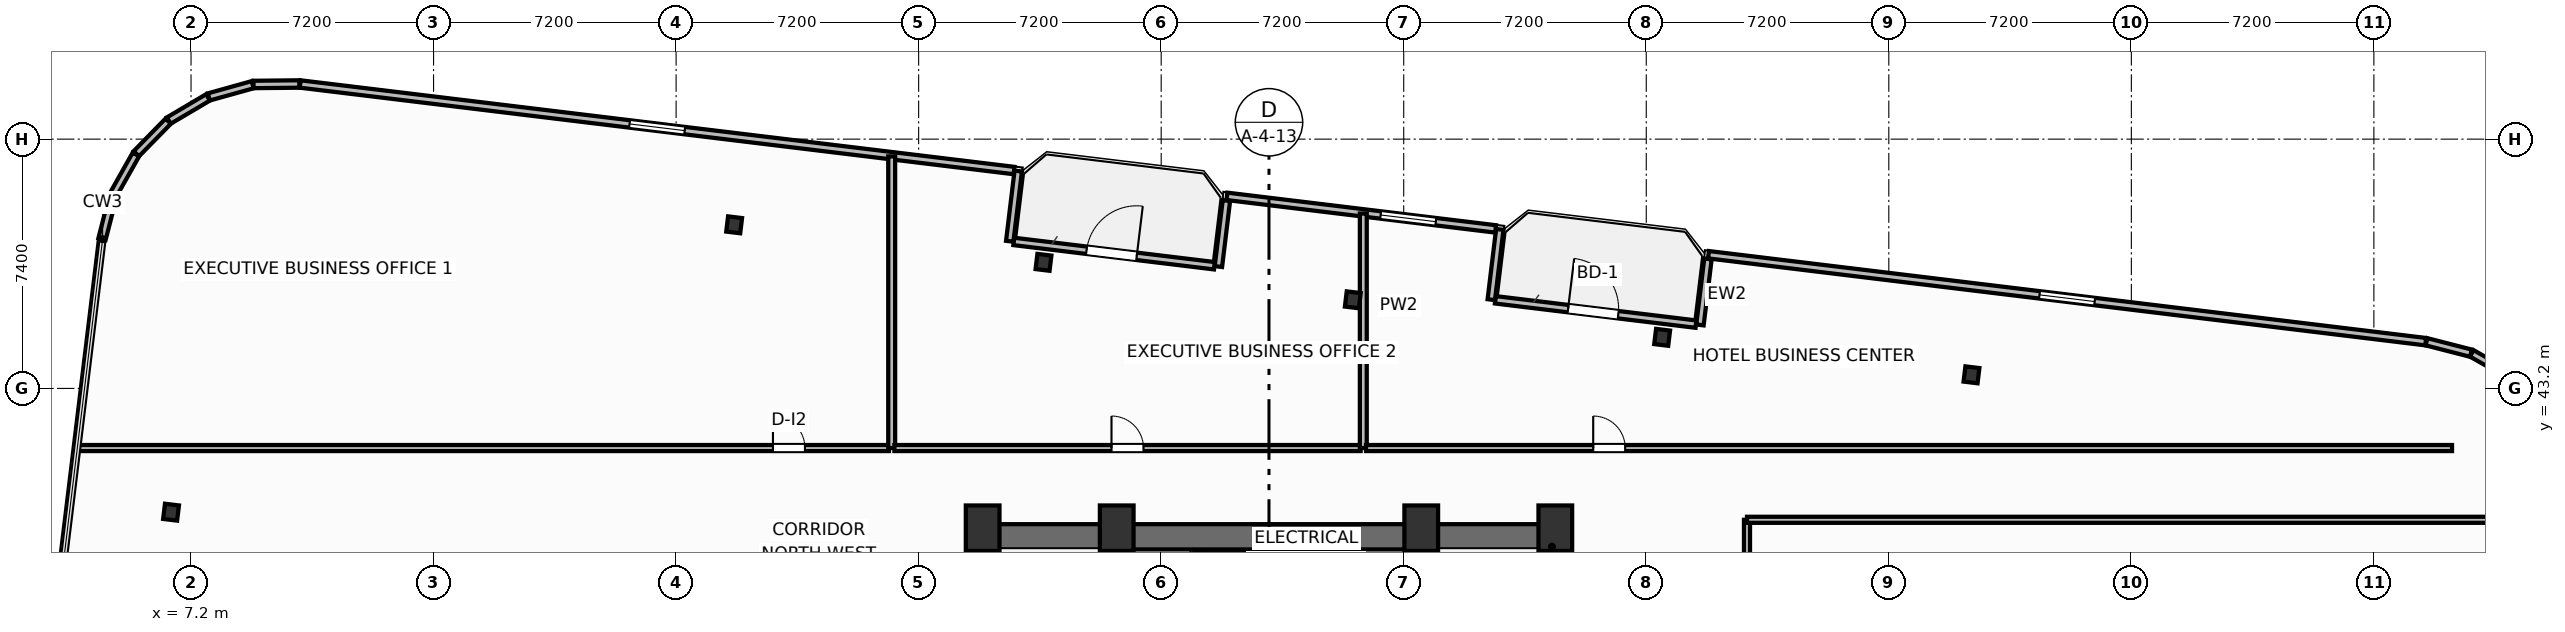
"""IFC4 building model, lengths in metres.
Left out: names, types, materials, properties, quantities, classifications, styles, units other than length and angle.
Written with IfcOpenShell. Run it as: python <this file> out.ifc"""

import sys

from ifc_helpers import new_model, si_unit, direction, frame, frame_2d, origin, origin_2d, place, context, subcontext, project, spatial, rectangle, i_section, extrude, element, fill, save


model = new_model("IFC4")
c1 = context("Model", 3, precision=1e-05, world=origin(), true_north=direction((0.0, 1.0)))
c2 = subcontext(c1, "Body", "Model", "MODEL_VIEW")
j1 = project(units=[si_unit("LENGTHUNIT", "METRE"), si_unit("PLANEANGLEUNIT", "RADIAN")], contexts=[c1])
p1 = place(None, origin())
s1 = spatial("IfcSite", under=j1, at=p1, CompositionType="ELEMENT")
p2 = place(p1, origin())
s2 = spatial("IfcBuilding", under=s1, at=p2, CompositionType="ELEMENT")
p3 = place(p2, frame((0.0, 0.0, 140.2)))
s3 = spatial("IfcBuildingStorey", under=s2, at=p3, CompositionType="ELEMENT", Elevation=140.2)
for number, where, z_axis, x_axis in (
    (1, (30.7, 39.05, 0.0), (0.0, 0.0, 1.0), (1.0, 0.0, 0.0)),
    (2, (34.68, 39.05, 0.0), (0.0, 0.0, 1.0), (1.0, 0.0, 0.0)),
    (3, (43.72, 39.05, 0.0), (0.0, 0.0, 1.0), (1.0, 0.0, 0.0)),
    (4, (47.7, 39.05, 0.0), (0.0, 0.0, 1.0), (1.0, 0.0, 0.0)),
):
    element("IfcColumn", number, at=place(p3, frame(where, z_axis=z_axis, x_axis=x_axis)), inside=s3, PredefinedType="COLUMN", context=c2, shape_type="SweptSolid", body=[
        extrude(rectangle(XDim=1.0, YDim=1.35, at=origin_2d()), origin(), (0.0, 0.0, 1.0), 3.7),
    ])
p4 = place(p3, frame((30.38, 38.795, 0.0), z_axis=(0.0, 0.0, 1.0), x_axis=(1.0, 0.0, 0.0)))
e5 = element("IfcWall", 5, at=p4, inside=s3, PredefinedType="SHEAR", context=c2, shape_type="SweptSolid", body=[
    extrude(rectangle(XDim=17.64, YDim=0.75, at=frame_2d((8.82, 0.0))), origin(), (0.0, 0.0, 1.0), 3.45),
])
for number, where, z_axis, x_axis in (
    (6, (30.755, 29.2, 0.0), (0.0, 0.0, 1.0), (0.0, 1.0, 0.0)),
    (7, (47.645, 29.2, 0.0), (0.0, 0.0, 1.0), (0.0, 1.0, 0.0)),
):
    element("IfcWall", number, at=place(p3, frame(where, z_axis=z_axis, x_axis=x_axis)), inside=s3, PredefinedType="SHEAR", context=c2, shape_type="SweptSolid", body=[
        extrude(rectangle(XDim=9.22, YDim=0.75, at=frame_2d((4.61, 0.0))), origin(), (0.0, 0.0, 1.0), 3.45),
    ])
p5 = place(p3, frame((34.64, 29.2, 0.0), z_axis=(0.0, 0.0, 1.0), x_axis=(0.0, 1.0, 0.0)))
e8 = element("IfcWall", 8, at=p5, inside=s3, PredefinedType="SHEAR", context=c2, shape_type="SweptSolid", body=[
    extrude(rectangle(XDim=9.22, YDim=0.25, at=frame_2d((4.61, 0.0))), origin(), (0.0, 0.0, 1.0), 3.45),
])
p6 = place(p5, frame((0.65, 0.0, 0.0)))
e9 = element("IfcOpeningElement", 9, at=p6, cuts=e8, PredefinedType="OPENING", context=c2, shape_type="SweptSolid", body=[
    extrude(rectangle(XDim=1.05, YDim=2.15, at=frame_2d((0.525, 1.075))), frame((0.0, 0.135, 0.0), z_axis=(0.0, -1.0, 0.0), x_axis=(1.0, 0.0, 0.0)), (0.0, 0.0, 1.0), 0.27),
])
p7 = place(p3, frame((43.76, 29.2, 0.0), z_axis=(0.0, 0.0, 1.0), x_axis=(0.0, 1.0, 0.0)))
e10 = element("IfcWall", 10, at=p7, inside=s3, PredefinedType="SHEAR", context=c2, shape_type="SweptSolid", body=[
    extrude(rectangle(XDim=9.22, YDim=0.25, at=frame_2d((4.61, 0.0))), origin(), (0.0, 0.0, 1.0), 3.45),
])
p8 = place(p7, frame((0.65, 0.0, 0.0)))
e11 = element("IfcOpeningElement", 11, at=p8, cuts=e10, PredefinedType="OPENING", context=c2, shape_type="SweptSolid", body=[
    extrude(rectangle(XDim=1.05, YDim=2.15, at=frame_2d((0.525, 1.075))), frame((0.0, 0.135, 0.0), z_axis=(0.0, -1.0, 0.0), x_axis=(1.0, 0.0, 0.0)), (0.0, 0.0, 1.0), 0.27),
])
for number, where, z_axis, x_axis in (
    (12, (60.054, 43.603, 0.0), (0.0, 0.0, 1.0), (0.993, -0.12, 0.0)),
    (13, (50.872, 44.717, 0.0), (0.0, 0.0, 1.0), (0.993, -0.12, 0.0)),
    (14, (41.689, 45.83, 0.0), (0.0, 0.0, 1.0), (0.993, -0.12, 0.0)),
    (15, (32.506, 46.943, 0.0), (0.0, 0.0, 1.0), (0.993, -0.12, 0.0)),
    (16, (23.323, 48.056, 0.0), (0.0, 0.0, 1.0), (0.993, -0.12, 0.0)),
    (17, (6.607, 39.526, 0.0), (0.0, 0.0, 1.0), (0.993, -0.12, 0.0)),
):
    element("IfcColumn", number, at=place(p3, frame(where, z_axis=z_axis, x_axis=x_axis)), inside=s3, PredefinedType="COLUMN", context=c2, shape_type="SweptSolid", body=[
        extrude(i_section(OverallWidth=0.418, OverallDepth=0.455, WebThickness=0.042, FlangeThickness=0.068, FilletRadius=0.025, at=origin_2d()), origin(), (0.0, 0.0, 1.0), 3.7),
    ])
p9 = place(p3, frame((31.624, 47.563, 0.0), z_axis=(0.0, 0.0, 1.0), x_axis=(0.992729951822, -0.120362962556, 0.0)))
e18 = element("IfcWall", 18, at=p9, inside=s3, PredefinedType="SOLIDWALL", context=c2, shape_type="SweptSolid", body=[
    extrude(rectangle(XDim=6.0, YDim=0.22, at=frame_2d((3.0, 0.0))), origin(), (0.0, 0.0, 1.0), 2.73),
])
p10 = place(p9, frame((2.176, 0.0, 0.0)))
e19 = element("IfcOpeningElement", 19, at=p10, cuts=e18, PredefinedType="OPENING", context=c2, shape_type="SweptSolid", body=[
    extrude(rectangle(XDim=1.5, YDim=2.25, at=frame_2d((0.75, 1.125))), frame((0.0, 0.12, 0.0), z_axis=(0.0, -1.0, 0.0), x_axis=(1.0, 0.0, 0.0)), (0.0, 0.0, 1.0), 0.24),
])
p11 = place(p3, frame((45.92, 45.831, 0.0), z_axis=(0.0, 0.0, 1.0), x_axis=(0.992729951822, -0.120362962556, 0.0)))
e20 = element("IfcWall", 20, at=p11, inside=s3, PredefinedType="SOLIDWALL", context=c2, shape_type="SweptSolid", body=[
    extrude(rectangle(XDim=6.0, YDim=0.22, at=frame_2d((3.0, 0.0))), origin(), (0.0, 0.0, 1.0), 2.73),
])
p12 = place(p11, frame((2.176, 0.0, 0.0)))
e21 = element("IfcOpeningElement", 21, at=p12, cuts=e20, PredefinedType="OPENING", context=c2, shape_type="SweptSolid", body=[
    extrude(rectangle(XDim=1.5, YDim=2.25, at=frame_2d((0.75, 1.125))), frame((0.0, 0.12, 0.0), z_axis=(0.0, -1.0, 0.0), x_axis=(1.0, 0.0, 0.0)), (0.0, 0.0, 1.0), 0.24),
])
p13 = place(p3, frame((76.084, 43.575, 0.0), z_axis=(0.0, 0.0, 1.0), x_axis=(-0.871093268227, 0.491117621399, 0.0)))
e22 = element("IfcWall", 22, at=p13, inside=s3, PredefinedType="SOLIDWALL", context=c2, shape_type="SweptSolid", body=[
    extrude(rectangle(XDim=1.353, YDim=0.22, at=frame_2d((0.677, 0.0))), origin(), (0.0, 0.0, 1.0), 2.73),
])
p14 = place(p3, frame((74.881, 44.246, 0.0), z_axis=(0.0, 0.0, 1.0), x_axis=(-0.968549775063, 0.248819881091, 0.0)))
e23 = element("IfcWall", 23, at=p14, inside=s3, PredefinedType="SOLIDWALL", context=c2, shape_type="SweptSolid", body=[
    extrude(rectangle(XDim=1.361, YDim=0.22, at=frame_2d((0.68, 0.0))), origin(), (0.0, 0.0, 1.0), 2.73),
])
p15 = place(p3, frame((73.538, 44.588, 0.0), z_axis=(0.0, 0.0, 1.0), x_axis=(-0.992733493583, 0.120333747213, 0.0)))
e24 = element("IfcWall", 24, at=p15, inside=s3, PredefinedType="SOLIDWALL", context=c2, shape_type="SweptSolid", body=[
    extrude(rectangle(XDim=21.447, YDim=0.22, at=frame_2d((10.724, 0.0))), origin(), (0.0, 0.0, 1.0), 2.73),
])
p16 = place(p15, frame((9.899, 0.0, 0.8)))
e25 = element("IfcOpeningElement", 25, at=p16, cuts=e24, PredefinedType="OPENING", context=c2, shape_type="SweptSolid", body=[
    extrude(rectangle(XDim=1.65, YDim=1.65, at=frame_2d((0.825, 0.825))), frame((0.0, 0.12, 0.0), z_axis=(0.0, -1.0, 0.0), x_axis=(1.0, 0.0, 0.0)), (0.0, 0.0, 1.0), 0.24),
])
p17 = place(p3, frame((52.231, 47.045, 0.0), z_axis=(0.0, 0.0, 1.0), x_axis=(-0.120275992932, -0.992740492538, 0.0)))
e26 = element("IfcWall", 26, at=p17, inside=s3, PredefinedType="SOLIDWALL", context=c2, shape_type="SweptSolid", body=[
    extrude(rectangle(XDim=1.975, YDim=0.22, at=frame_2d((0.988, 0.0))), origin(), (0.0, 0.0, 1.0), 2.73),
])
p18 = place(p3, frame((45.799, 45.835, 0.0), z_axis=(0.0, 0.0, 1.0), x_axis=(0.120314009587, 0.992735885871, 0.0)))
e27 = element("IfcWall", 27, at=p18, inside=s3, PredefinedType="SOLIDWALL", context=c2, shape_type="SweptSolid", body=[
    extrude(rectangle(XDim=2.1, YDim=0.22, at=frame_2d((1.05, 0.0))), origin(), (0.0, 0.0, 1.0), 2.73),
])
p19 = place(p3, frame((45.928, 47.935, 0.0), z_axis=(0.0, 0.0, 1.0), x_axis=(-0.992730591876, 0.120357683402, 0.0)))
e28 = element("IfcWall", 28, at=p19, inside=s3, PredefinedType="SOLIDWALL", context=c2, shape_type="SweptSolid", body=[
    extrude(rectangle(XDim=8.035, YDim=0.22, at=frame_2d((4.017, 0.0))), origin(), (0.0, 0.0, 1.0), 2.73),
])
p20 = place(p19, frame((1.788, 0.0, 0.8)))
e29 = element("IfcOpeningElement", 29, at=p20, cuts=e28, PredefinedType="OPENING", context=c2, shape_type="SweptSolid", body=[
    extrude(rectangle(XDim=1.65, YDim=1.65, at=frame_2d((0.825, 0.825))), frame((0.0, 0.12, 0.0), z_axis=(0.0, -1.0, 0.0), x_axis=(1.0, 0.0, 0.0)), (0.0, 0.0, 1.0), 0.24),
])
p21 = place(p3, frame((37.936, 48.778, 0.0), z_axis=(0.0, 0.0, 1.0), x_axis=(-0.120397815541, -0.992725725472, 0.0)))
e30 = element("IfcWall", 30, at=p21, inside=s3, PredefinedType="SOLIDWALL", context=c2, shape_type="SweptSolid", body=[
    extrude(rectangle(XDim=1.975, YDim=0.22, at=frame_2d((0.988, 0.0))), origin(), (0.0, 0.0, 1.0), 2.73),
])
p22 = place(p3, frame((31.504, 47.568, 0.0), z_axis=(0.0, 0.0, 1.0), x_axis=(0.120341784665, 0.992732519294, 0.0)))
e31 = element("IfcWall", 31, at=p22, inside=s3, PredefinedType="SOLIDWALL", context=c2, shape_type="SweptSolid", body=[
    extrude(rectangle(XDim=2.1, YDim=0.22, at=frame_2d((1.05, 0.0))), origin(), (0.0, 0.0, 1.0), 2.73),
])
p23 = place(p3, frame((31.633, 49.668, 0.0), z_axis=(0.0, 0.0, 1.0), x_axis=(-0.992731670483, 0.120348786531, 0.0)))
e32 = element("IfcWall", 32, at=p23, inside=s3, PredefinedType="SOLIDWALL", context=c2, shape_type="SweptSolid", body=[
    extrude(rectangle(XDim=21.347, YDim=0.22, at=frame_2d((10.674, 0.0))), origin(), (0.0, 0.0, 1.0), 2.73),
])
p24 = place(p23, frame((9.849, 0.0, 0.8)))
e33 = element("IfcOpeningElement", 33, at=p24, cuts=e32, PredefinedType="OPENING", context=c2, shape_type="SweptSolid", body=[
    extrude(rectangle(XDim=1.65, YDim=1.65, at=frame_2d((0.825, 0.825))), frame((0.0, 0.12, 0.0), z_axis=(0.0, -1.0, 0.0), x_axis=(1.0, 0.0, 0.0)), (0.0, 0.0, 1.0), 0.24),
])
p25 = place(p3, frame((10.416, 52.237, 0.0), z_axis=(0.0, 0.0, 1.0), x_axis=(-0.999947718056, -0.010225514878, 0.0)))
e34 = element("IfcWall", 34, at=p25, inside=s3, PredefinedType="SOLIDWALL", context=c2, shape_type="SweptSolid", body=[
    extrude(rectangle(XDim=1.361, YDim=0.22, at=frame_2d((0.68, 0.0))), origin(), (0.0, 0.0, 1.0), 2.73),
])
for number, where, z_axis, x_axis in (
    (35, (9.031, 52.216, 0.0), (0.0, 0.0, 1.0), (-0.963, -0.269, 0.0)),
    (36, (7.706, 51.84, 0.0), (0.0, 0.0, 1.0), (-0.861, -0.509, 0.0)),
):
    element("IfcWall", number, at=place(p3, frame(where, z_axis=z_axis, x_axis=x_axis)), inside=s3, PredefinedType="SOLIDWALL", context=c2, shape_type="SweptSolid", body=[
        extrude(rectangle(XDim=1.353, YDim=0.22, at=frame_2d((0.677, 0.0))), origin(), (0.0, 0.0, 1.0), 2.73),
    ])
p26 = place(p3, frame((6.523, 51.133, 0.0), z_axis=(0.0, 0.0, 1.0), x_axis=(-0.699762925925, -0.714375144795, 0.0)))
e37 = element("IfcWall", 37, at=p26, inside=s3, PredefinedType="SOLIDWALL", context=c2, shape_type="SweptSolid", body=[
    extrude(rectangle(XDim=1.353, YDim=0.22, at=frame_2d((0.677, 0.0))), origin(), (0.0, 0.0, 1.0), 2.73),
])
p27 = place(p3, frame((5.564, 50.145, 0.0), z_axis=(0.0, 0.0, 1.0), x_axis=(-0.491117621399, -0.871093268227, 0.0)))
e38 = element("IfcWall", 38, at=p27, inside=s3, PredefinedType="SOLIDWALL", context=c2, shape_type="SweptSolid", body=[
    extrude(rectangle(XDim=1.353, YDim=0.22, at=frame_2d((0.677, 0.0))), origin(), (0.0, 0.0, 1.0), 2.73),
])
p28 = place(p3, frame((4.894, 48.942, 0.0), z_axis=(0.0, 0.0, 1.0), x_axis=(-0.248857256909, -0.968540172468, 0.0)))
e39 = element("IfcWall", 39, at=p28, inside=s3, PredefinedType="SOLIDWALL", context=c2, shape_type="SweptSolid", body=[
    extrude(rectangle(XDim=1.353, YDim=0.22, at=frame_2d((0.676, 0.0))), origin(), (0.0, 0.0, 1.0), 2.73),
])
p29 = place(p3, frame((3.864, 41.43, 0.0), z_axis=(0.0, 0.0, 1.0), x_axis=(1.0, 0.0, 0.0)))
e40 = element("IfcWall", 40, at=p29, inside=s3, PredefinedType="PARTITIONING", context=c2, shape_type="SweptSolid", body=[
    extrude(rectangle(XDim=24.056, YDim=0.18, at=frame_2d((12.028, 0.0))), origin(), (0.0, 0.0, 1.0), 3.45),
])
p30 = place(p29, frame((20.611, 0.0, 0.0)))
e41 = element("IfcOpeningElement", 41, at=p30, cuts=e40, PredefinedType="OPENING", context=c2, shape_type="SweptSolid", body=[
    extrude(rectangle(XDim=0.95, YDim=2.05, at=frame_2d((0.475, 1.025))), frame((0.0, 0.1, 0.0), z_axis=(0.0, -1.0, 0.0), x_axis=(1.0, 0.0, 0.0)), (0.0, 0.0, 1.0), 0.2),
])
p31 = place(p3, frame((28.0, 41.43, 0.0), z_axis=(0.0, 0.0, 1.0), x_axis=(0.0, 1.0, 0.0)))
e42 = element("IfcWall", 42, at=p31, inside=s3, PredefinedType="PARTITIONING", context=c2, shape_type="SweptSolid", body=[
    extrude(rectangle(XDim=8.658, YDim=0.205, at=frame_2d((4.329, 0.0))), origin(), (0.0, 0.0, 1.0), 3.45),
])
p32 = place(p3, frame((28.08, 41.43, 0.0), z_axis=(0.0, 0.0, 1.0), x_axis=(1.0, 0.0, 0.0)))
e43 = element("IfcWall", 43, at=p32, inside=s3, PredefinedType="PARTITIONING", context=c2, shape_type="SweptSolid", body=[
    extrude(rectangle(XDim=13.84, YDim=0.18, at=frame_2d((6.92, 0.0))), origin(), (0.0, 0.0, 1.0), 3.45),
])
p33 = place(p32, frame((6.445, 0.0, 0.0)))
e44 = element("IfcOpeningElement", 44, at=p33, cuts=e43, PredefinedType="OPENING", context=c2, shape_type="SweptSolid", body=[
    extrude(rectangle(XDim=0.95, YDim=2.05, at=frame_2d((0.475, 1.025))), frame((0.0, 0.1, 0.0), z_axis=(0.0, -1.0, 0.0), x_axis=(1.0, 0.0, 0.0)), (0.0, 0.0, 1.0), 0.2),
])
p34 = place(p3, frame((42.0, 41.43, 0.0), z_axis=(0.0, 0.0, 1.0), x_axis=(0.0, 1.0, 0.0)))
e45 = element("IfcWall", 45, at=p34, inside=s3, PredefinedType="PARTITIONING", context=c2, shape_type="SweptSolid", body=[
    extrude(rectangle(XDim=6.961, YDim=0.205, at=frame_2d((3.48, 0.0))), origin(), (0.0, 0.0, 1.0), 2.662),
])
p35 = place(p3, frame((42.08, 41.43, 0.0), z_axis=(0.0, 0.0, 1.0), x_axis=(1.0, 0.0, 0.0)))
e46 = element("IfcWall", 46, at=p35, inside=s3, PredefinedType="PARTITIONING", context=c2, shape_type="SweptSolid", body=[
    extrude(rectangle(XDim=32.24, YDim=0.18, at=frame_2d((16.12, 0.0))), origin(), (0.0, 0.0, 1.0), 3.45),
])
p36 = place(p35, frame((6.745, 0.0, 0.0)))
e47 = element("IfcOpeningElement", 47, at=p36, cuts=e46, PredefinedType="OPENING", context=c2, shape_type="SweptSolid", body=[
    extrude(rectangle(XDim=0.95, YDim=2.05, at=frame_2d((0.475, 1.025))), frame((0.0, 0.1, 0.0), z_axis=(0.0, -1.0, 0.0), x_axis=(1.0, 0.0, 0.0)), (0.0, 0.0, 1.0), 0.2),
])
p37 = place(p3, frame((53.39, 19.24, 0.0), z_axis=(0.0, 0.0, 1.0), x_axis=(0.0, 1.0, 0.0)))
e48 = element("IfcWall", 48, at=p37, inside=s3, PredefinedType="PARTITIONING", context=c2, shape_type="SweptSolid", body=[
    extrude(rectangle(XDim=20.06, YDim=0.18, at=frame_2d((10.03, 0.0))), origin(), (0.0, 0.0, 1.0), 3.45),
])
p38 = place(p37, frame((7.7, 0.0, 0.0)))
e49 = element("IfcOpeningElement", 49, at=p38, cuts=e48, PredefinedType="OPENING", context=c2, shape_type="SweptSolid", body=[
    extrude(rectangle(XDim=0.95, YDim=2.05, at=frame_2d((0.475, 1.025))), frame((0.0, 0.1, 0.0), z_axis=(0.0, -1.0, 0.0), x_axis=(1.0, 0.0, 0.0)), (0.0, 0.0, 1.0), 0.2),
])
p39 = place(p3, frame((53.39, 39.3, 0.0), z_axis=(0.0, 0.0, 1.0), x_axis=(1.0, 0.0, 0.0)))
e50 = element("IfcWall", 50, at=p39, inside=s3, PredefinedType="PARTITIONING", context=c2, shape_type="SweptSolid", body=[
    extrude(rectangle(XDim=24.74, YDim=0.18, at=frame_2d((12.37, 0.0))), origin(), (0.0, 0.0, 1.0), 3.45),
])
p40 = place(p10, origin())
e51 = element("IfcDoor", 51, at=p40, inside=s3, OperationType="SINGLE_SWING_RIGHT", PredefinedType="DOOR", context=c2, shape_type="SweptSolid", body=[
    extrude(rectangle(XDim=1.5, YDim=2.25, at=frame_2d((0.75, 1.125))), frame((0.0, 0.025, 0.0), z_axis=(0.0, -1.0, 0.0), x_axis=(1.0, 0.0, 0.0)), (0.0, 0.0, 1.0), 0.05),
])
fill(e19, e51)
p41 = place(p12, origin())
e52 = element("IfcDoor", 52, at=p41, inside=s3, OperationType="SINGLE_SWING_LEFT", PredefinedType="DOOR", context=c2, shape_type="SweptSolid", body=[
    extrude(rectangle(XDim=1.5, YDim=2.25, at=frame_2d((0.75, 1.125))), frame((0.0, 0.025, 0.0), z_axis=(0.0, -1.0, 0.0), x_axis=(1.0, 0.0, 0.0)), (0.0, 0.0, 1.0), 0.05),
])
fill(e21, e52)
p42 = place(p16, origin())
e53 = element("IfcWindow", 53, at=p42, inside=s3, PartitioningType="SINGLE_PANEL", PredefinedType="WINDOW", context=c2, shape_type="SweptSolid", body=[
    extrude(rectangle(XDim=1.65, YDim=1.65, at=frame_2d((0.825, 0.825))), frame((0.0, 0.03, 0.0), z_axis=(0.0, -1.0, 0.0), x_axis=(1.0, 0.0, 0.0)), (0.0, 0.0, 1.0), 0.06),
])
fill(e25, e53)
p43 = place(p20, origin())
e54 = element("IfcWindow", 54, at=p43, inside=s3, PartitioningType="SINGLE_PANEL", PredefinedType="WINDOW", context=c2, shape_type="SweptSolid", body=[
    extrude(rectangle(XDim=1.65, YDim=1.65, at=frame_2d((0.825, 0.825))), frame((0.0, 0.03, 0.0), z_axis=(0.0, -1.0, 0.0), x_axis=(1.0, 0.0, 0.0)), (0.0, 0.0, 1.0), 0.06),
])
fill(e29, e54)
p44 = place(p24, origin())
e55 = element("IfcWindow", 55, at=p44, inside=s3, PartitioningType="SINGLE_PANEL", PredefinedType="WINDOW", context=c2, shape_type="SweptSolid", body=[
    extrude(rectangle(XDim=1.65, YDim=1.65, at=frame_2d((0.825, 0.825))), frame((0.0, 0.03, 0.0), z_axis=(0.0, -1.0, 0.0), x_axis=(1.0, 0.0, 0.0)), (0.0, 0.0, 1.0), 0.06),
])
fill(e33, e55)
p45 = place(p30, origin())
e56 = element("IfcDoor", 56, at=p45, inside=s3, OperationType="SINGLE_SWING_LEFT", PredefinedType="DOOR", context=c2, shape_type="SweptSolid", body=[
    extrude(rectangle(XDim=0.95, YDim=2.05, at=frame_2d((0.475, 1.025))), frame((0.0, 0.025, 0.0), z_axis=(0.0, -1.0, 0.0), x_axis=(1.0, 0.0, 0.0)), (0.0, 0.0, 1.0), 0.05),
])
fill(e41, e56)
p46 = place(p33, origin())
e57 = element("IfcDoor", 57, at=p46, inside=s3, OperationType="SINGLE_SWING_LEFT", PredefinedType="DOOR", context=c2, shape_type="SweptSolid", body=[
    extrude(rectangle(XDim=0.95, YDim=2.05, at=frame_2d((0.475, 1.025))), frame((0.0, 0.025, 0.0), z_axis=(0.0, -1.0, 0.0), x_axis=(1.0, 0.0, 0.0)), (0.0, 0.0, 1.0), 0.05),
])
fill(e44, e57)
p47 = place(p36, origin())
e58 = element("IfcDoor", 58, at=p47, inside=s3, OperationType="SINGLE_SWING_LEFT", PredefinedType="DOOR", context=c2, shape_type="SweptSolid", body=[
    extrude(rectangle(XDim=0.95, YDim=2.05, at=frame_2d((0.475, 1.025))), frame((0.0, 0.025, 0.0), z_axis=(0.0, -1.0, 0.0), x_axis=(1.0, 0.0, 0.0)), (0.0, 0.0, 1.0), 0.05),
])
fill(e47, e58)
save(model, sys.argv[1])
